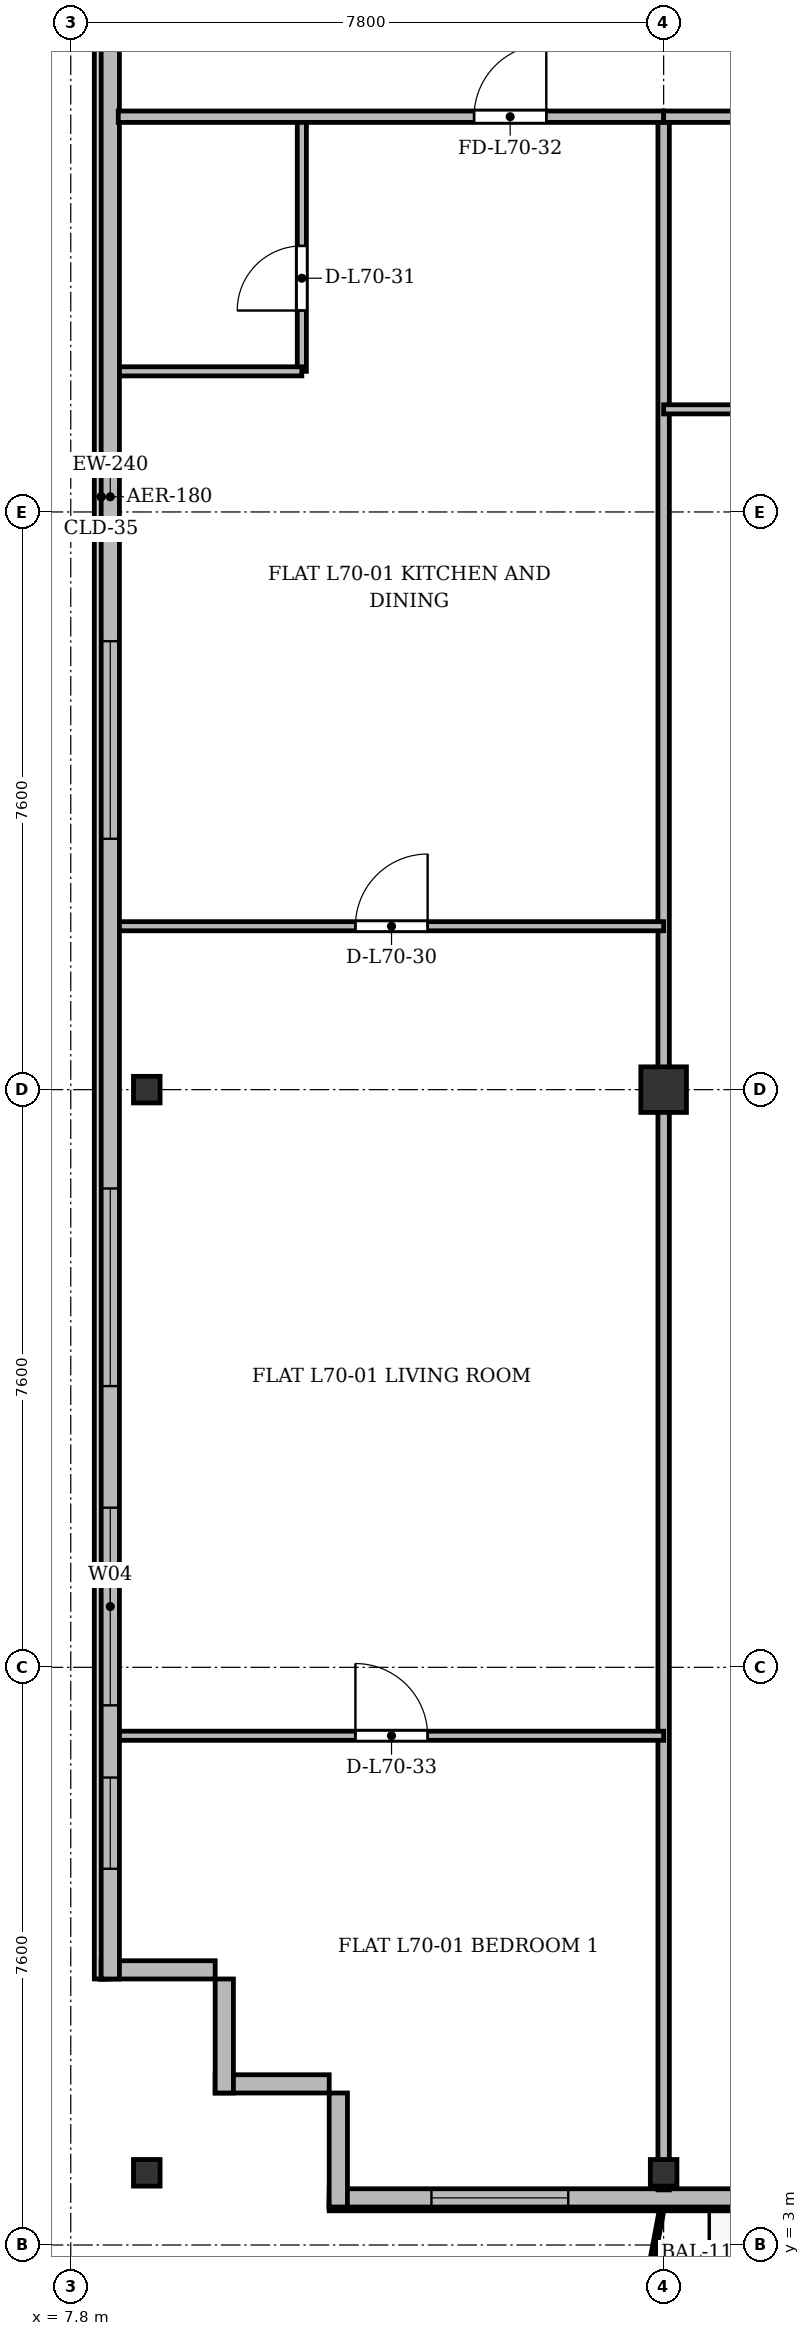
"""IFC4 building model, lengths in metres.
Left out: names, types, materials, properties, quantities, classifications, styles, units other than length and angle.
Written with IfcOpenShell. Run it as: python <this file> out.ifc"""

import sys

from ifc_helpers import new_model, si_unit, direction, frame, frame_2d, origin, origin_2d, place, context, subcontext, project, spatial, rectangle, i_section, extrude, source, transform, mapped, element, fill, save


model = new_model("IFC4")
c1 = context("Model", 3, precision=1e-05, world=origin(), true_north=direction((0.0, 1.0)))
c2 = subcontext(c1, "Body", "Model", "MODEL_VIEW")
j1 = project(units=[si_unit("LENGTHUNIT", "METRE"), si_unit("PLANEANGLEUNIT", "RADIAN")], contexts=[c1])
p1 = place(None, origin())
s1 = spatial("IfcSite", under=j1, at=p1, CompositionType="ELEMENT")
p2 = place(p1, origin())
s2 = spatial("IfcBuilding", under=s1, at=p2, CompositionType="ELEMENT")
p3 = place(p2, frame((0.0, 0.0, 270.3)))
s3 = spatial("IfcBuildingStorey", under=s2, at=p3, CompositionType="ELEMENT", Elevation=270.3)
m1 = source(origin(), c2, "Body", "SweptSolid", [
    extrude(i_section(OverallWidth=0.35, OverallDepth=0.35, WebThickness=0.018, FlangeThickness=0.028, at=origin_2d()), origin(), (0.0, 0.0, 1.0), 3.6),
])
for number, where, z_axis, x_axis in (
    (1, (8.8, 3.95, 0.0), (0.0, 0.0, 1.0), (1.0, 0.0, 0.0)),
    (2, (8.8, 18.2, 0.0), (0.0, 0.0, 1.0), (1.0, 0.0, 0.0)),
    (3, (15.6, 3.95, 0.0), (0.0, 0.0, 1.0), (1.0, 0.0, 0.0)),
):
    element("IfcColumn", number, at=place(p3, frame(where, z_axis=z_axis, x_axis=x_axis)), inside=s3, PredefinedType="COLUMN", context=c2, shape_type="MappedRepresentation", body=[
        mapped(m1, transform((0.0, 0.0, 0.0), x_axis=(1.0, 0.0, 0.0), y_axis=(0.0, 1.0, 0.0), z_axis=(0.0, 0.0, 1.0), scale=1.0)),
    ])
m2 = source(origin(), c2, "Body", "SweptSolid", [
    extrude(rectangle(XDim=0.6, YDim=0.6, at=origin_2d()), origin(), (0.0, 0.0, 1.0), 3.6),
])
p4 = place(p3, frame((15.6, 18.2, 0.0), z_axis=(0.0, 0.0, 1.0), x_axis=(1.0, 0.0, 0.0)))
e4 = element("IfcColumn", 4, at=p4, inside=s3, PredefinedType="COLUMN", context=c2, shape_type="MappedRepresentation", body=[
    mapped(m2, transform((0.0, 0.0, 0.0), x_axis=(1.0, 0.0, 0.0), y_axis=(0.0, 1.0, 0.0), z_axis=(0.0, 0.0, 1.0), scale=1.0)),
])
for number, where, z_axis, x_axis in (
    (5, (11.2, 5.12, 0.0), (0.0, 0.0, 1.0), (-1.0, 0.0, 0.0)),
    (6, (9.82, 5.0, 0.0), (0.0, 0.0, 1.0), (0.0, 1.0, 0.0)),
):
    element("IfcWall", number, at=place(p3, frame(where, z_axis=z_axis, x_axis=x_axis)), inside=s3, PredefinedType="SOLIDWALL", context=c2, shape_type="SweptSolid", body=[
        extrude(rectangle(XDim=1.5, YDim=0.24, at=frame_2d((0.75, 0.0))), origin(), (0.0, 0.0, 1.0), 3.37),
    ])
p5 = place(p3, frame((9.7, 6.62, 0.0), z_axis=(0.0, 0.0, 1.0), x_axis=(-1.0, 0.0, 0.0)))
e7 = element("IfcWall", 7, at=p5, inside=s3, PredefinedType="SOLIDWALL", context=c2, shape_type="SweptSolid", body=[
    extrude(rectangle(XDim=1.5, YDim=0.24, at=frame_2d((0.75, 0.0))), origin(), (0.0, 0.0, 1.0), 2.87),
])
p6 = place(p3, frame((8.32, 6.5, 0.0), z_axis=(0.0, 0.0, 1.0), x_axis=(0.0, 1.0, 0.0)))
e8 = element("IfcWall", 8, at=p6, inside=s3, PredefinedType="SOLIDWALL", context=c2, shape_type="SweptSolid", body=[
    extrude(rectangle(XDim=39.0, YDim=0.24, at=frame_2d((19.5, 0.0))), origin(), (0.0, 0.0, 1.0), 3.37),
])
p7 = place(p6, frame((1.45, 0.0, 0.92)))
e9 = element("IfcOpeningElement", 9, at=p7, cuts=e8, PredefinedType="OPENING", context=c2, shape_type="SweptSolid", body=[
    extrude(rectangle(XDim=1.2, YDim=1.65, at=frame_2d((0.6, 0.825))), frame((0.0, 0.13, 0.0), z_axis=(0.0, -1.0, 0.0), x_axis=(1.0, 0.0, 0.0)), (0.0, 0.0, 1.0), 0.26),
])
p8 = place(p6, frame((3.6, 0.0, 0.92)))
e10 = element("IfcOpeningElement", 10, at=p8, cuts=e8, PredefinedType="OPENING", context=c2, shape_type="SweptSolid", body=[
    extrude(rectangle(XDim=2.6, YDim=1.9, at=frame_2d((1.3, 0.95))), frame((0.0, 0.13, 0.0), z_axis=(0.0, -1.0, 0.0), x_axis=(1.0, 0.0, 0.0)), (0.0, 0.0, 1.0), 0.26),
])
p9 = place(p6, frame((7.8, 0.0, 0.92)))
e11 = element("IfcOpeningElement", 11, at=p9, cuts=e8, PredefinedType="OPENING", context=c2, shape_type="SweptSolid", body=[
    extrude(rectangle(XDim=2.6, YDim=1.9, at=frame_2d((1.3, 0.95))), frame((0.0, 0.13, 0.0), z_axis=(0.0, -1.0, 0.0), x_axis=(1.0, 0.0, 0.0)), (0.0, 0.0, 1.0), 0.26),
])
p10 = place(p6, frame((15.0, 0.0, 0.92)))
e12 = element("IfcOpeningElement", 12, at=p10, cuts=e8, PredefinedType="OPENING", context=c2, shape_type="SweptSolid", body=[
    extrude(rectangle(XDim=2.6, YDim=1.9, at=frame_2d((1.3, 0.95))), frame((0.0, 0.13, 0.0), z_axis=(0.0, -1.0, 0.0), x_axis=(1.0, 0.0, 0.0)), (0.0, 0.0, 1.0), 0.26),
])
p11 = place(p6, frame((29.0, 0.0, 0.92)))
e13 = element("IfcOpeningElement", 13, at=p11, cuts=e8, PredefinedType="OPENING", context=c2, shape_type="SweptSolid", body=[
    extrude(rectangle(XDim=2.6, YDim=1.9, at=frame_2d((1.3, 0.95))), frame((0.0, 0.13, 0.0), z_axis=(0.0, -1.0, 0.0), x_axis=(1.0, 0.0, 0.0)), (0.0, 0.0, 1.0), 0.26),
])
p12 = place(p6, frame((33.3, 0.0, 0.92)))
e14 = element("IfcOpeningElement", 14, at=p12, cuts=e8, PredefinedType="OPENING", context=c2, shape_type="SweptSolid", body=[
    extrude(rectangle(XDim=1.2, YDim=1.65, at=frame_2d((0.6, 0.825))), frame((0.0, 0.13, 0.0), z_axis=(0.0, -1.0, 0.0), x_axis=(1.0, 0.0, 0.0)), (0.0, 0.0, 1.0), 0.26),
])
p13 = place(p6, frame((36.65, 0.0, 0.92)))
e15 = element("IfcOpeningElement", 15, at=p13, cuts=e8, PredefinedType="OPENING", context=c2, shape_type="SweptSolid", body=[
    extrude(rectangle(XDim=1.2, YDim=1.65, at=frame_2d((0.6, 0.825))), frame((0.0, 0.13, 0.0), z_axis=(0.0, -1.0, 0.0), x_axis=(1.0, 0.0, 0.0)), (0.0, 0.0, 1.0), 0.26),
])
p14 = place(p3, frame((63.2, 3.62, 0.0), z_axis=(0.0, 0.0, 1.0), x_axis=(-1.0, 0.0, 0.0)))
e16 = element("IfcWall", 16, at=p14, inside=s3, PredefinedType="SOLIDWALL", context=c2, shape_type="SweptSolid", body=[
    extrude(rectangle(XDim=52.0, YDim=0.24, at=frame_2d((26.0, 0.0))), origin(), (0.0, 0.0, 1.0), 3.37),
])
p15 = place(p14, frame((1.345, 0.0, 0.9)))
e17 = element("IfcOpeningElement", 17, at=p15, cuts=e16, PredefinedType="OPENING", context=c2, shape_type="SweptSolid", body=[
    extrude(rectangle(XDim=1.8, YDim=1.8, at=frame_2d((0.9, 0.9))), frame((0.0, 0.13, 0.0), z_axis=(0.0, -1.0, 0.0), x_axis=(1.0, 0.0, 0.0)), (0.0, 0.0, 1.0), 0.26),
])
p16 = place(p14, frame((5.1, 0.0, 0.9)))
e18 = element("IfcOpeningElement", 18, at=p16, cuts=e16, PredefinedType="OPENING", context=c2, shape_type="SweptSolid", body=[
    extrude(rectangle(XDim=2.2, YDim=1.8, at=frame_2d((1.1, 0.9))), frame((0.0, 0.13, 0.0), z_axis=(0.0, -1.0, 0.0), x_axis=(1.0, 0.0, 0.0)), (0.0, 0.0, 1.0), 0.26),
])
p17 = place(p14, frame((9.35, 0.0, 0.9)))
e19 = element("IfcOpeningElement", 19, at=p17, cuts=e16, PredefinedType="OPENING", context=c2, shape_type="SweptSolid", body=[
    extrude(rectangle(XDim=1.5, YDim=1.75, at=frame_2d((0.75, 0.875))), frame((0.0, 0.13, 0.0), z_axis=(0.0, -1.0, 0.0), x_axis=(1.0, 0.0, 0.0)), (0.0, 0.0, 1.0), 0.26),
])
p18 = place(p14, frame((14.017, 0.0, 0.0)))
e20 = element("IfcOpeningElement", 20, at=p18, cuts=e16, PredefinedType="OPENING", context=c2, shape_type="SweptSolid", body=[
    extrude(rectangle(XDim=1.2, YDim=2.2, at=frame_2d((0.6, 1.1))), frame((0.0, 0.13, 0.0), z_axis=(0.0, -1.0, 0.0), x_axis=(1.0, 0.0, 0.0)), (0.0, 0.0, 1.0), 0.26),
])
p19 = place(p14, frame((25.175, 0.0, 0.9)))
e21 = element("IfcOpeningElement", 21, at=p19, cuts=e16, PredefinedType="OPENING", context=c2, shape_type="SweptSolid", body=[
    extrude(rectangle(XDim=1.65, YDim=1.85, at=frame_2d((0.825, 0.925))), frame((0.0, 0.13, 0.0), z_axis=(0.0, -1.0, 0.0), x_axis=(1.0, 0.0, 0.0)), (0.0, 0.0, 1.0), 0.26),
])
p20 = place(p14, frame((33.01, 0.0, 0.9)))
e22 = element("IfcOpeningElement", 22, at=p20, cuts=e16, PredefinedType="OPENING", context=c2, shape_type="SweptSolid", body=[
    extrude(rectangle(XDim=1.8, YDim=1.8, at=frame_2d((0.9, 0.9))), frame((0.0, 0.13, 0.0), z_axis=(0.0, -1.0, 0.0), x_axis=(1.0, 0.0, 0.0)), (0.0, 0.0, 1.0), 0.26),
])
p21 = place(p14, frame((35.45, 0.0, 0.9)))
e23 = element("IfcOpeningElement", 23, at=p21, cuts=e16, PredefinedType="OPENING", context=c2, shape_type="SweptSolid", body=[
    extrude(rectangle(XDim=1.5, YDim=1.75, at=frame_2d((0.75, 0.875))), frame((0.0, 0.13, 0.0), z_axis=(0.0, -1.0, 0.0), x_axis=(1.0, 0.0, 0.0)), (0.0, 0.0, 1.0), 0.26),
])
p22 = place(p14, frame((37.85, 0.0, 0.9)))
e24 = element("IfcOpeningElement", 24, at=p22, cuts=e16, PredefinedType="OPENING", context=c2, shape_type="SweptSolid", body=[
    extrude(rectangle(XDim=1.5, YDim=1.75, at=frame_2d((0.75, 0.875))), frame((0.0, 0.13, 0.0), z_axis=(0.0, -1.0, 0.0), x_axis=(1.0, 0.0, 0.0)), (0.0, 0.0, 1.0), 0.26),
])
p23 = place(p14, frame((41.452, 0.0, 0.0)))
e25 = element("IfcOpeningElement", 25, at=p23, cuts=e16, PredefinedType="OPENING", context=c2, shape_type="SweptSolid", body=[
    extrude(rectangle(XDim=1.2, YDim=2.2, at=frame_2d((0.6, 1.1))), frame((0.0, 0.13, 0.0), z_axis=(0.0, -1.0, 0.0), x_axis=(1.0, 0.0, 0.0)), (0.0, 0.0, 1.0), 0.26),
])
p24 = place(p14, frame((44.575, 0.0, 0.9)))
e26 = element("IfcOpeningElement", 26, at=p24, cuts=e16, PredefinedType="OPENING", context=c2, shape_type="SweptSolid", body=[
    extrude(rectangle(XDim=1.65, YDim=1.85, at=frame_2d((0.825, 0.925))), frame((0.0, 0.13, 0.0), z_axis=(0.0, -1.0, 0.0), x_axis=(1.0, 0.0, 0.0)), (0.0, 0.0, 1.0), 0.26),
])
p25 = place(p14, frame((48.855, 0.0, 0.9)))
e27 = element("IfcOpeningElement", 27, at=p25, cuts=e16, PredefinedType="OPENING", context=c2, shape_type="SweptSolid", body=[
    extrude(rectangle(XDim=1.8, YDim=1.8, at=frame_2d((0.9, 0.9))), frame((0.0, 0.13, 0.0), z_axis=(0.0, -1.0, 0.0), x_axis=(1.0, 0.0, 0.0)), (0.0, 0.0, 1.0), 0.26),
])
p26 = place(p3, frame((11.32, 3.5, 0.0), z_axis=(0.0, 0.0, 1.0), x_axis=(0.0, 1.0, 0.0)))
e28 = element("IfcWall", 28, at=p26, inside=s3, PredefinedType="SOLIDWALL", context=c2, shape_type="SweptSolid", body=[
    extrude(rectangle(XDim=1.5, YDim=0.24, at=frame_2d((0.75, 0.0))), origin(), (0.0, 0.0, 1.0), 2.92),
])
p27 = place(p3, frame((15.6, 3.725, 0.0), z_axis=(0.0, 0.0, 1.0), x_axis=(0.0, 1.0, 0.0)))
e29 = element("IfcWall", 29, at=p27, inside=s3, PredefinedType="PARTITIONING", context=c2, shape_type="SweptSolid", body=[
    extrude(rectangle(XDim=27.275, YDim=0.15, at=frame_2d((13.637, 0.0))), origin(), (0.0, 0.0, 1.0), 2.87),
])
p28 = place(p3, frame((8.44, 20.35, 0.0), z_axis=(0.0, 0.0, 1.0), x_axis=(1.0, 0.0, 0.0)))
e30 = element("IfcWall", 30, at=p28, inside=s3, PredefinedType="PARTITIONING", context=c2, shape_type="SweptSolid", body=[
    extrude(rectangle(XDim=7.16, YDim=0.12, at=frame_2d((3.58, 0.0))), origin(), (0.0, 0.0, 1.0), 2.87),
])
p29 = place(p28, frame((3.105, 0.0, 0.0)))
e31 = element("IfcOpeningElement", 31, at=p29, cuts=e30, PredefinedType="OPENING", context=c2, shape_type="SweptSolid", body=[
    extrude(rectangle(XDim=0.95, YDim=2.15, at=frame_2d((0.475, 1.075))), frame((0.0, 0.07, 0.0), z_axis=(0.0, -1.0, 0.0), x_axis=(1.0, 0.0, 0.0)), (0.0, 0.0, 1.0), 0.14),
])
p30 = place(p3, frame((10.84, 27.65, 0.0), z_axis=(0.0, 0.0, 1.0), x_axis=(0.0, 1.0, 0.0)))
e32 = element("IfcWall", 32, at=p30, inside=s3, PredefinedType="PARTITIONING", context=c2, shape_type="SweptSolid", body=[
    extrude(rectangle(XDim=3.35, YDim=0.12, at=frame_2d((1.675, 0.0))), origin(), (0.0, 0.0, 1.0), 3.37),
])
p31 = place(p30, frame((0.8, 0.0, 0.0)))
e33 = element("IfcOpeningElement", 33, at=p31, cuts=e32, PredefinedType="OPENING", context=c2, shape_type="SweptSolid", body=[
    extrude(rectangle(XDim=0.85, YDim=2.1, at=frame_2d((0.425, 1.05))), frame((0.0, 0.07, 0.0), z_axis=(0.0, -1.0, 0.0), x_axis=(1.0, 0.0, 0.0)), (0.0, 0.0, 1.0), 0.14),
])
p32 = place(p3, frame((8.44, 27.65, 0.0), z_axis=(0.0, 0.0, 1.0), x_axis=(1.0, 0.0, 0.0)))
e34 = element("IfcWall", 34, at=p32, inside=s3, PredefinedType="PARTITIONING", context=c2, shape_type="SweptSolid", body=[
    extrude(rectangle(XDim=2.4, YDim=0.12, at=frame_2d((1.2, 0.0))), origin(), (0.0, 0.0, 1.0), 2.87),
])
p33 = place(p3, frame((8.425, 31.0, 0.0), z_axis=(0.0, 0.0, 1.0), x_axis=(1.0, 0.0, 0.0)))
e35 = element("IfcWall", 35, at=p33, inside=s3, PredefinedType="PARTITIONING", context=c2, shape_type="SweptSolid", body=[
    extrude(rectangle(XDim=7.175, YDim=0.15, at=frame_2d((3.587, 0.0))), origin(), (0.0, 0.0, 1.0), 2.87),
])
p34 = place(p33, frame((4.681, 0.0, 0.0)))
e36 = element("IfcOpeningElement", 36, at=p34, cuts=e35, PredefinedType="OPENING", context=c2, shape_type="SweptSolid", body=[
    extrude(rectangle(XDim=0.95, YDim=2.15, at=frame_2d((0.475, 1.075))), frame((0.0, 0.085, 0.0), z_axis=(0.0, -1.0, 0.0), x_axis=(1.0, 0.0, 0.0)), (0.0, 0.0, 1.0), 0.17),
])
p35 = place(p3, frame((8.44, 9.7, 0.0), z_axis=(0.0, 0.0, 1.0), x_axis=(1.0, 0.0, 0.0)))
e37 = element("IfcWall", 37, at=p35, inside=s3, PredefinedType="PARTITIONING", context=c2, shape_type="SweptSolid", body=[
    extrude(rectangle(XDim=7.16, YDim=0.12, at=frame_2d((3.58, 0.0))), origin(), (0.0, 0.0, 1.0), 2.87),
])
p36 = place(p35, frame((3.105, 0.0, 0.0)))
e38 = element("IfcOpeningElement", 38, at=p36, cuts=e37, PredefinedType="OPENING", context=c2, shape_type="SweptSolid", body=[
    extrude(rectangle(XDim=0.95, YDim=2.15, at=frame_2d((0.475, 1.075))), frame((0.0, 0.07, 0.0), z_axis=(0.0, -1.0, 0.0), x_axis=(1.0, 0.0, 0.0)), (0.0, 0.0, 1.0), 0.14),
])
p37 = place(p3, frame((15.6, 31.0, 0.0), z_axis=(0.0, 0.0, 1.0), x_axis=(1.0, 0.0, 0.0)))
e39 = element("IfcWall", 39, at=p37, inside=s3, PredefinedType="PARTITIONING", context=c2, shape_type="SweptSolid", body=[
    extrude(rectangle(XDim=4.4, YDim=0.15, at=frame_2d((2.2, 0.0))), origin(), (0.0, 0.0, 1.0), 2.87),
])
p38 = place(p37, frame((1.725, 0.0, 0.0)))
e40 = element("IfcOpeningElement", 40, at=p38, cuts=e39, PredefinedType="OPENING", context=c2, shape_type="SweptSolid", body=[
    extrude(rectangle(XDim=0.95, YDim=2.15, at=frame_2d((0.475, 1.075))), frame((0.0, 0.085, 0.0), z_axis=(0.0, -1.0, 0.0), x_axis=(1.0, 0.0, 0.0)), (0.0, 0.0, 1.0), 0.17),
])
p39 = place(p3, frame((15.6, 27.15, 0.0), z_axis=(0.0, 0.0, 1.0), x_axis=(1.0, 0.0, 0.0)))
e41 = element("IfcWall", 41, at=p39, inside=s3, PredefinedType="PARTITIONING", context=c2, shape_type="SweptSolid", body=[
    extrude(rectangle(XDim=4.4, YDim=0.12, at=frame_2d((2.2, 0.0))), origin(), (0.0, 0.0, 1.0), 2.87),
])
p40 = place(p39, frame((1.725, 0.0, 0.0)))
e42 = element("IfcOpeningElement", 42, at=p40, cuts=e41, PredefinedType="OPENING", context=c2, shape_type="SweptSolid", body=[
    extrude(rectangle(XDim=0.95, YDim=2.15, at=frame_2d((0.475, 1.075))), frame((0.0, 0.07, 0.0), z_axis=(0.0, -1.0, 0.0), x_axis=(1.0, 0.0, 0.0)), (0.0, 0.0, 1.0), 0.14),
])
m3 = source(origin(), c2, "Body", "SweptSolid", [
    extrude(rectangle(XDim=1.2, YDim=1.65, at=frame_2d((0.6, 0.825))), frame((0.0, 0.03, 0.0), z_axis=(0.0, -1.0, 0.0), x_axis=(1.0, 0.0, 0.0)), (0.0, 0.0, 1.0), 0.06),
])
p41 = place(p7, origin())
e43 = element("IfcWindow", 43, at=p41, inside=s3, PartitioningType="SINGLE_PANEL", PredefinedType="WINDOW", context=c2, shape_type="MappedRepresentation", body=[
    mapped(m3, transform((0.0, 0.0, 0.0), x_axis=(1.0, 0.0, 0.0), y_axis=(0.0, 1.0, 0.0), z_axis=(0.0, 0.0, 1.0), scale=1.0)),
])
fill(e9, e43)
m4 = source(origin(), c2, "Body", "SweptSolid", [
    extrude(rectangle(XDim=2.6, YDim=1.9, at=frame_2d((1.3, 0.95))), frame((0.0, 0.03, 0.0), z_axis=(0.0, -1.0, 0.0), x_axis=(1.0, 0.0, 0.0)), (0.0, 0.0, 1.0), 0.06),
])
p42 = place(p8, origin())
e44 = element("IfcWindow", 44, at=p42, inside=s3, PartitioningType="SINGLE_PANEL", PredefinedType="WINDOW", context=c2, shape_type="MappedRepresentation", body=[
    mapped(m4, transform((0.0, 0.0, 0.0), x_axis=(1.0, 0.0, 0.0), y_axis=(0.0, 1.0, 0.0), z_axis=(0.0, 0.0, 1.0), scale=1.0)),
])
fill(e10, e44)
p43 = place(p9, origin())
e45 = element("IfcWindow", 45, at=p43, inside=s3, PartitioningType="SINGLE_PANEL", PredefinedType="WINDOW", context=c2, shape_type="MappedRepresentation", body=[
    mapped(m4, transform((0.0, 0.0, 0.0), x_axis=(1.0, 0.0, 0.0), y_axis=(0.0, 1.0, 0.0), z_axis=(0.0, 0.0, 1.0), scale=1.0)),
])
fill(e11, e45)
p44 = place(p10, origin())
e46 = element("IfcWindow", 46, at=p44, inside=s3, PartitioningType="SINGLE_PANEL", PredefinedType="WINDOW", context=c2, shape_type="MappedRepresentation", body=[
    mapped(m4, transform((0.0, 0.0, 0.0), x_axis=(1.0, 0.0, 0.0), y_axis=(0.0, 1.0, 0.0), z_axis=(0.0, 0.0, 1.0), scale=1.0)),
])
fill(e12, e46)
m5 = source(origin(), c2, "Body", "SweptSolid", [
    extrude(rectangle(XDim=1.8, YDim=1.8, at=frame_2d((0.9, 0.9))), frame((0.0, 0.03, 0.0), z_axis=(0.0, -1.0, 0.0), x_axis=(1.0, 0.0, 0.0)), (0.0, 0.0, 1.0), 0.06),
])
p45 = place(p25, origin())
e47 = element("IfcWindow", 47, at=p45, inside=s3, PartitioningType="SINGLE_PANEL", PredefinedType="WINDOW", context=c2, shape_type="MappedRepresentation", body=[
    mapped(m5, transform((0.0, 0.0, 0.0), x_axis=(1.0, 0.0, 0.0), y_axis=(0.0, 1.0, 0.0), z_axis=(0.0, 0.0, 1.0), scale=1.0)),
])
fill(e27, e47)
m6 = source(origin(), c2, "Body", "SweptSolid", [
    extrude(rectangle(XDim=0.95, YDim=2.15, at=frame_2d((0.475, 1.075))), frame((0.0, 0.025, 0.0), z_axis=(0.0, -1.0, 0.0), x_axis=(1.0, 0.0, 0.0)), (0.0, 0.0, 1.0), 0.05),
])
p46 = place(p29, origin())
e48 = element("IfcDoor", 48, at=p46, inside=s3, OperationType="SINGLE_SWING_RIGHT", PredefinedType="DOOR", context=c2, shape_type="MappedRepresentation", body=[
    mapped(m6, transform((0.0, 0.0, 0.0), x_axis=(1.0, 0.0, 0.0), y_axis=(0.0, 1.0, 0.0), z_axis=(0.0, 0.0, 1.0), scale=1.0)),
])
fill(e31, e48)
m7 = source(origin(), c2, "Body", "SweptSolid", [
    extrude(rectangle(XDim=0.85, YDim=2.1, at=frame_2d((0.425, 1.05))), frame((0.0, 0.025, 0.0), z_axis=(0.0, -1.0, 0.0), x_axis=(1.0, 0.0, 0.0)), (0.0, 0.0, 1.0), 0.05),
])
p47 = place(p31, origin())
e49 = element("IfcDoor", 49, at=p47, inside=s3, OperationType="SINGLE_SWING_LEFT", PredefinedType="DOOR", context=c2, shape_type="MappedRepresentation", body=[
    mapped(m7, transform((0.0, 0.0, 0.0), x_axis=(1.0, 0.0, 0.0), y_axis=(0.0, 1.0, 0.0), z_axis=(0.0, 0.0, 1.0), scale=1.0)),
])
fill(e33, e49)
p48 = place(p34, origin())
e50 = element("IfcDoor", 50, at=p48, inside=s3, OperationType="SINGLE_SWING_RIGHT", PredefinedType="DOOR", context=c2, shape_type="MappedRepresentation", body=[
    mapped(m6, transform((0.0, 0.0, 0.0), x_axis=(1.0, 0.0, 0.0), y_axis=(0.0, 1.0, 0.0), z_axis=(0.0, 0.0, 1.0), scale=1.0)),
])
fill(e36, e50)
p49 = place(p36, origin())
e51 = element("IfcDoor", 51, at=p49, inside=s3, OperationType="SINGLE_SWING_LEFT", PredefinedType="DOOR", context=c2, shape_type="MappedRepresentation", body=[
    mapped(m6, transform((0.0, 0.0, 0.0), x_axis=(1.0, 0.0, 0.0), y_axis=(0.0, 1.0, 0.0), z_axis=(0.0, 0.0, 1.0), scale=1.0)),
])
fill(e38, e51)
save(model, sys.argv[1])
